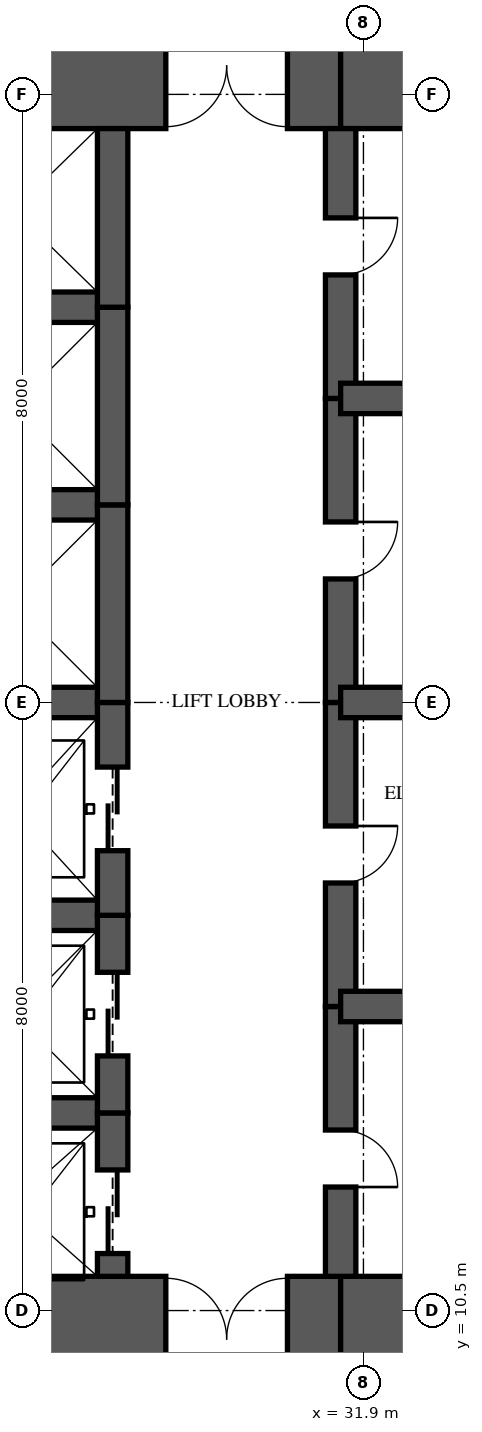
"""IFC4 building model, lengths in metres.
Left out: names, types, materials, properties, quantities, classifications, styles, units other than length and angle.
Written with IfcOpenShell. Run it as: python <this file> out.ifc"""

import sys

from ifc_helpers import new_model, si_unit, direction, frame, frame_2d, origin, place, context, subcontext, project, spatial, rectangle, extrude, element, fill, save


model = new_model("IFC4")
c1 = context("Model", 3, precision=1e-05, world=origin(), true_north=direction((0.0, 1.0)))
c2 = subcontext(c1, "Body", "Model", "MODEL_VIEW")
j1 = project(units=[si_unit("LENGTHUNIT", "METRE"), si_unit("PLANEANGLEUNIT", "RADIAN")], contexts=[c1])
p1 = place(None, origin())
s1 = spatial("IfcSite", under=j1, at=p1, CompositionType="ELEMENT")
p2 = place(p1, origin())
s2 = spatial("IfcBuilding", under=s1, at=p2, CompositionType="ELEMENT")
p3 = place(p2, frame((0.0, 0.0, 67.9)))
s3 = spatial("IfcBuildingStorey", under=s2, at=p3, CompositionType="ELEMENT", Elevation=67.9)
p4 = place(p3, frame((26.0, 10.125, 0.0), z_axis=(0.0, 0.0, 1.0), x_axis=(1.0, 0.0, 0.0)))
e1 = element("IfcWall", 1, at=p4, inside=s3, PredefinedType="SHEAR", context=c2, shape_type="SweptSolid", body=[
    extrude(rectangle(XDim=5.6, YDim=1.65, at=frame_2d((2.8, 0.0))), origin(), (0.0, 0.0, 1.0), 3.35),
])
p5 = place(p4, frame((3.3, 0.0, 0.0)))
e2 = element("IfcOpeningElement", 2, at=p5, cuts=e1, PredefinedType="OPENING", context=c2, shape_type="SweptSolid", body=[
    extrude(rectangle(XDim=1.6, YDim=2.1, at=frame_2d((0.8, 1.05))), frame((0.0, 0.835, 0.0), z_axis=(0.0, -1.0, 0.0), x_axis=(1.0, 0.0, 0.0)), (0.0, 0.0, 1.0), 1.67),
])
for number, where, z_axis, x_axis in (
    (3, (31.6, 10.125, 0.0), (0.0, 0.0, 1.0), (1.0, 0.0, 0.0)),
    (4, (35.9, 26.875, 0.0), (0.0, 0.0, 1.0), (-1.0, 0.0, 0.0)),
):
    element("IfcWall", number, at=place(p3, frame(where, z_axis=z_axis, x_axis=x_axis)), inside=s3, PredefinedType="SHEAR", context=c2, shape_type="SweptSolid", body=[
        extrude(rectangle(XDim=4.3, YDim=1.65, at=frame_2d((2.15, 0.0))), origin(), (0.0, 0.0, 1.0), 3.35),
    ])
p6 = place(p3, frame((31.6, 26.875, 0.0), z_axis=(0.0, 0.0, 1.0), x_axis=(-1.0, 0.0, 0.0)))
e5 = element("IfcWall", 5, at=p6, inside=s3, PredefinedType="SHEAR", context=c2, shape_type="SweptSolid", body=[
    extrude(rectangle(XDim=5.6, YDim=1.65, at=frame_2d((2.8, 0.0))), origin(), (0.0, 0.0, 1.0), 3.35),
])
p7 = place(p6, frame((0.7, 0.0, 0.0)))
e6 = element("IfcOpeningElement", 6, at=p7, cuts=e5, PredefinedType="OPENING", context=c2, shape_type="SweptSolid", body=[
    extrude(rectangle(XDim=1.6, YDim=2.1, at=frame_2d((0.8, 1.05))), frame((0.0, 0.835, 0.0), z_axis=(0.0, -1.0, 0.0), x_axis=(1.0, 0.0, 0.0)), (0.0, 0.0, 1.0), 1.67),
])
p8 = place(p3, frame((28.6, 10.95, 0.0), z_axis=(0.0, 0.0, 1.0), x_axis=(0.0, 1.0, 0.0)))
e7 = element("IfcWall", 7, at=p8, inside=s3, PredefinedType="SHEAR", context=c2, shape_type="SweptSolid", body=[
    extrude(rectangle(XDim=2.15, YDim=0.4, at=frame_2d((1.075, 0.0))), origin(), (0.0, 0.0, 1.0), 3.35),
])
p9 = place(p8, frame((0.3, 0.0, 0.0)))
e8 = element("IfcOpeningElement", 8, at=p9, cuts=e7, PredefinedType="OPENING", context=c2, shape_type="SweptSolid", body=[
    extrude(rectangle(XDim=1.1, YDim=2.1, at=frame_2d((0.55, 1.05))), frame((0.0, 0.21, 0.0), z_axis=(0.0, -1.0, 0.0), x_axis=(1.0, 0.0, 0.0)), (0.0, 0.0, 1.0), 0.42),
])
p10 = place(p3, frame((28.6, 13.1, 0.0), z_axis=(0.0, 0.0, 1.0), x_axis=(0.0, 1.0, 0.0)))
e9 = element("IfcWall", 9, at=p10, inside=s3, PredefinedType="SHEAR", context=c2, shape_type="SweptSolid", body=[
    extrude(rectangle(XDim=2.6, YDim=0.4, at=frame_2d((1.3, 0.0))), origin(), (0.0, 0.0, 1.0), 3.35),
])
p11 = place(p10, frame((0.75, 0.0, 0.0)))
e10 = element("IfcOpeningElement", 10, at=p11, cuts=e9, PredefinedType="OPENING", context=c2, shape_type="SweptSolid", body=[
    extrude(rectangle(XDim=1.1, YDim=2.1, at=frame_2d((0.55, 1.05))), frame((0.0, 0.21, 0.0), z_axis=(0.0, -1.0, 0.0), x_axis=(1.0, 0.0, 0.0)), (0.0, 0.0, 1.0), 0.42),
])
p12 = place(p3, frame((28.6, 15.7, 0.0), z_axis=(0.0, 0.0, 1.0), x_axis=(0.0, 1.0, 0.0)))
e11 = element("IfcWall", 11, at=p12, inside=s3, PredefinedType="SHEAR", context=c2, shape_type="SweptSolid", body=[
    extrude(rectangle(XDim=2.8, YDim=0.4, at=frame_2d((1.4, 0.0))), origin(), (0.0, 0.0, 1.0), 3.35),
])
p13 = place(p12, frame((0.85, 0.0, 0.0)))
e12 = element("IfcOpeningElement", 12, at=p13, cuts=e11, PredefinedType="OPENING", context=c2, shape_type="SweptSolid", body=[
    extrude(rectangle(XDim=1.1, YDim=2.1, at=frame_2d((0.55, 1.05))), frame((0.0, 0.21, 0.0), z_axis=(0.0, -1.0, 0.0), x_axis=(1.0, 0.0, 0.0)), (0.0, 0.0, 1.0), 0.42),
])
p14 = place(p3, frame((28.6, 18.5, 0.0), z_axis=(0.0, 0.0, 1.0), x_axis=(0.0, 1.0, 0.0)))
e13 = element("IfcWall", 13, at=p14, inside=s3, PredefinedType="SHEAR", context=c2, shape_type="SweptSolid", body=[
    extrude(rectangle(XDim=2.6, YDim=0.4, at=frame_2d((1.3, 0.0))), origin(), (0.0, 0.0, 1.0), 3.35),
])
p15 = place(p3, frame((28.6, 21.1, 0.0), z_axis=(0.0, 0.0, 1.0), x_axis=(0.0, 1.0, 0.0)))
e14 = element("IfcWall", 14, at=p15, inside=s3, PredefinedType="SHEAR", context=c2, shape_type="SweptSolid", body=[
    extrude(rectangle(XDim=2.6, YDim=0.4, at=frame_2d((1.3, 0.0))), origin(), (0.0, 0.0, 1.0), 3.35),
])
p16 = place(p3, frame((28.6, 23.7, 0.0), z_axis=(0.0, 0.0, 1.0), x_axis=(0.0, 1.0, 0.0)))
e15 = element("IfcWall", 15, at=p16, inside=s3, PredefinedType="SHEAR", context=c2, shape_type="SweptSolid", body=[
    extrude(rectangle(XDim=2.35, YDim=0.4, at=frame_2d((1.175, 0.0))), origin(), (0.0, 0.0, 1.0), 3.35),
])
p17 = place(p3, frame((31.6, 10.95, 0.0), z_axis=(0.0, 0.0, 1.0), x_axis=(0.0, 1.0, 0.0)))
e16 = element("IfcWall", 16, at=p17, inside=s3, PredefinedType="SHEAR", context=c2, shape_type="SweptSolid", body=[
    extrude(rectangle(XDim=3.55, YDim=0.4, at=frame_2d((1.775, 0.0))), origin(), (0.0, 0.0, 1.0), 3.35),
])
p18 = place(p17, frame((1.175, 0.0, 0.0)))
e17 = element("IfcOpeningElement", 17, at=p18, cuts=e16, PredefinedType="OPENING", context=c2, shape_type="SweptSolid", body=[
    extrude(rectangle(XDim=0.75, YDim=2.1, at=frame_2d((0.375, 1.05))), frame((0.0, 0.21, 0.0), z_axis=(0.0, -1.0, 0.0), x_axis=(1.0, 0.0, 0.0)), (0.0, 0.0, 1.0), 0.42),
])
p19 = place(p3, frame((31.6, 14.5, 0.0), z_axis=(0.0, 0.0, 1.0), x_axis=(0.0, 1.0, 0.0)))
e18 = element("IfcWall", 18, at=p19, inside=s3, PredefinedType="SHEAR", context=c2, shape_type="SweptSolid", body=[
    extrude(rectangle(XDim=4.0, YDim=0.4, at=frame_2d((2.0, 0.0))), origin(), (0.0, 0.0, 1.0), 3.35),
])
p20 = place(p19, frame((1.625, 0.0, 0.0)))
e19 = element("IfcOpeningElement", 19, at=p20, cuts=e18, PredefinedType="OPENING", context=c2, shape_type="SweptSolid", body=[
    extrude(rectangle(XDim=0.75, YDim=2.1, at=frame_2d((0.375, 1.05))), frame((0.0, 0.21, 0.0), z_axis=(0.0, -1.0, 0.0), x_axis=(1.0, 0.0, 0.0)), (0.0, 0.0, 1.0), 0.42),
])
p21 = place(p3, frame((31.6, 18.5, 0.0), z_axis=(0.0, 0.0, 1.0), x_axis=(0.0, 1.0, 0.0)))
e20 = element("IfcWall", 20, at=p21, inside=s3, PredefinedType="SHEAR", context=c2, shape_type="SweptSolid", body=[
    extrude(rectangle(XDim=4.0, YDim=0.4, at=frame_2d((2.0, 0.0))), origin(), (0.0, 0.0, 1.0), 3.35),
])
p22 = place(p21, frame((1.625, 0.0, 0.0)))
e21 = element("IfcOpeningElement", 21, at=p22, cuts=e20, PredefinedType="OPENING", context=c2, shape_type="SweptSolid", body=[
    extrude(rectangle(XDim=0.75, YDim=2.1, at=frame_2d((0.375, 1.05))), frame((0.0, 0.21, 0.0), z_axis=(0.0, -1.0, 0.0), x_axis=(1.0, 0.0, 0.0)), (0.0, 0.0, 1.0), 0.42),
])
p23 = place(p3, frame((31.6, 22.5, 0.0), z_axis=(0.0, 0.0, 1.0), x_axis=(0.0, 1.0, 0.0)))
e22 = element("IfcWall", 22, at=p23, inside=s3, PredefinedType="SHEAR", context=c2, shape_type="SweptSolid", body=[
    extrude(rectangle(XDim=3.55, YDim=0.4, at=frame_2d((1.775, 0.0))), origin(), (0.0, 0.0, 1.0), 3.35),
])
p24 = place(p23, frame((1.625, 0.0, 0.0)))
e23 = element("IfcOpeningElement", 23, at=p24, cuts=e22, PredefinedType="OPENING", context=c2, shape_type="SweptSolid", body=[
    extrude(rectangle(XDim=0.75, YDim=2.1, at=frame_2d((0.375, 1.05))), frame((0.0, 0.21, 0.0), z_axis=(0.0, -1.0, 0.0), x_axis=(1.0, 0.0, 0.0)), (0.0, 0.0, 1.0), 0.42),
])
for number, where, z_axis, x_axis in (
    (24, (26.0, 13.1, 0.0), (0.0, 0.0, 1.0), (1.0, 0.0, 0.0)),
    (25, (26.0, 15.7, 0.0), (0.0, 0.0, 1.0), (1.0, 0.0, 0.0)),
    (26, (26.0, 18.5, 0.0), (0.0, 0.0, 1.0), (1.0, 0.0, 0.0)),
    (27, (26.0, 21.1, 0.0), (0.0, 0.0, 1.0), (1.0, 0.0, 0.0)),
    (28, (26.0, 23.7, 0.0), (0.0, 0.0, 1.0), (1.0, 0.0, 0.0)),
):
    element("IfcWall", number, at=place(p3, frame(where, z_axis=z_axis, x_axis=x_axis)), inside=s3, PredefinedType="SHEAR", context=c2, shape_type="SweptSolid", body=[
        extrude(rectangle(XDim=2.6, YDim=0.4, at=frame_2d((1.3, 0.0))), origin(), (0.0, 0.0, 1.0), 3.35),
    ])
for number, where, z_axis, x_axis in (
    (29, (31.6, 14.5, 0.0), (0.0, 0.0, 1.0), (1.0, 0.0, 0.0)),
    (30, (31.6, 18.5, 0.0), (0.0, 0.0, 1.0), (1.0, 0.0, 0.0)),
    (31, (31.6, 22.5, 0.0), (0.0, 0.0, 1.0), (1.0, 0.0, 0.0)),
):
    element("IfcWall", number, at=place(p3, frame(where, z_axis=z_axis, x_axis=x_axis)), inside=s3, PredefinedType="SHEAR", context=c2, shape_type="SweptSolid", body=[
        extrude(rectangle(XDim=4.3, YDim=0.4, at=frame_2d((2.15, 0.0))), origin(), (0.0, 0.0, 1.0), 3.35),
    ])
p25 = place(p9, origin())
e32 = element("IfcDoor", 32, at=p25, inside=s3, OperationType="SLIDING_TO_LEFT", PredefinedType="DOOR", context=c2, shape_type="SweptSolid", body=[
    extrude(rectangle(XDim=1.1, YDim=2.1, at=frame_2d((0.55, 1.05))), frame((0.0, 0.025, 0.0), z_axis=(0.0, -1.0, 0.0), x_axis=(1.0, 0.0, 0.0)), (0.0, 0.0, 1.0), 0.05),
])
fill(e8, e32)
p26 = place(p11, origin())
e33 = element("IfcDoor", 33, at=p26, inside=s3, OperationType="SLIDING_TO_LEFT", PredefinedType="DOOR", context=c2, shape_type="SweptSolid", body=[
    extrude(rectangle(XDim=1.1, YDim=2.1, at=frame_2d((0.55, 1.05))), frame((0.0, 0.025, 0.0), z_axis=(0.0, -1.0, 0.0), x_axis=(1.0, 0.0, 0.0)), (0.0, 0.0, 1.0), 0.05),
])
fill(e10, e33)
p27 = place(p13, origin())
e34 = element("IfcDoor", 34, at=p27, inside=s3, OperationType="SLIDING_TO_LEFT", PredefinedType="DOOR", context=c2, shape_type="SweptSolid", body=[
    extrude(rectangle(XDim=1.1, YDim=2.1, at=frame_2d((0.55, 1.05))), frame((0.0, 0.025, 0.0), z_axis=(0.0, -1.0, 0.0), x_axis=(1.0, 0.0, 0.0)), (0.0, 0.0, 1.0), 0.05),
])
fill(e12, e34)
p28 = place(p5, origin())
e35 = element("IfcDoor", 35, at=p28, inside=s3, OperationType="DOUBLE_DOOR_SINGLE_SWING", PredefinedType="DOOR", context=c2, shape_type="SweptSolid", body=[
    extrude(rectangle(XDim=1.6, YDim=2.1, at=frame_2d((0.8, 1.05))), frame((0.0, 0.025, 0.0), z_axis=(0.0, -1.0, 0.0), x_axis=(1.0, 0.0, 0.0)), (0.0, 0.0, 1.0), 0.05),
])
fill(e2, e35)
p29 = place(p7, origin())
e36 = element("IfcDoor", 36, at=p29, inside=s3, OperationType="DOUBLE_DOOR_SINGLE_SWING", PredefinedType="DOOR", context=c2, shape_type="SweptSolid", body=[
    extrude(rectangle(XDim=1.6, YDim=2.1, at=frame_2d((0.8, 1.05))), frame((0.0, 0.025, 0.0), z_axis=(0.0, -1.0, 0.0), x_axis=(1.0, 0.0, 0.0)), (0.0, 0.0, 1.0), 0.05),
])
fill(e6, e36)
p30 = place(p18, frame((0.75, 0.0, 0.0), z_axis=(0.0, 0.0, 1.0), x_axis=(-1.0, 0.0, 0.0)))
e37 = element("IfcDoor", 37, at=p30, inside=s3, OperationType="SINGLE_SWING_RIGHT", PredefinedType="DOOR", context=c2, shape_type="SweptSolid", body=[
    extrude(rectangle(XDim=0.75, YDim=2.1, at=frame_2d((0.375, 1.05))), frame((0.0, 0.025, 0.0), z_axis=(0.0, -1.0, 0.0), x_axis=(1.0, 0.0, 0.0)), (0.0, 0.0, 1.0), 0.05),
])
fill(e17, e37)
p31 = place(p20, frame((0.75, 0.0, 0.0), z_axis=(0.0, 0.0, 1.0), x_axis=(-1.0, 0.0, 0.0)))
e38 = element("IfcDoor", 38, at=p31, inside=s3, OperationType="SINGLE_SWING_LEFT", PredefinedType="DOOR", context=c2, shape_type="SweptSolid", body=[
    extrude(rectangle(XDim=0.75, YDim=2.1, at=frame_2d((0.375, 1.05))), frame((0.0, 0.025, 0.0), z_axis=(0.0, -1.0, 0.0), x_axis=(1.0, 0.0, 0.0)), (0.0, 0.0, 1.0), 0.05),
])
fill(e19, e38)
p32 = place(p22, frame((0.75, 0.0, 0.0), z_axis=(0.0, 0.0, 1.0), x_axis=(-1.0, 0.0, 0.0)))
e39 = element("IfcDoor", 39, at=p32, inside=s3, OperationType="SINGLE_SWING_LEFT", PredefinedType="DOOR", context=c2, shape_type="SweptSolid", body=[
    extrude(rectangle(XDim=0.75, YDim=2.1, at=frame_2d((0.375, 1.05))), frame((0.0, 0.025, 0.0), z_axis=(0.0, -1.0, 0.0), x_axis=(1.0, 0.0, 0.0)), (0.0, 0.0, 1.0), 0.05),
])
fill(e21, e39)
p33 = place(p24, frame((0.75, 0.0, 0.0), z_axis=(0.0, 0.0, 1.0), x_axis=(-1.0, 0.0, 0.0)))
e40 = element("IfcDoor", 40, at=p33, inside=s3, OperationType="SINGLE_SWING_LEFT", PredefinedType="DOOR", context=c2, shape_type="SweptSolid", body=[
    extrude(rectangle(XDim=0.75, YDim=2.1, at=frame_2d((0.375, 1.05))), frame((0.0, 0.025, 0.0), z_axis=(0.0, -1.0, 0.0), x_axis=(1.0, 0.0, 0.0)), (0.0, 0.0, 1.0), 0.05),
])
fill(e23, e40)
save(model, sys.argv[1])
